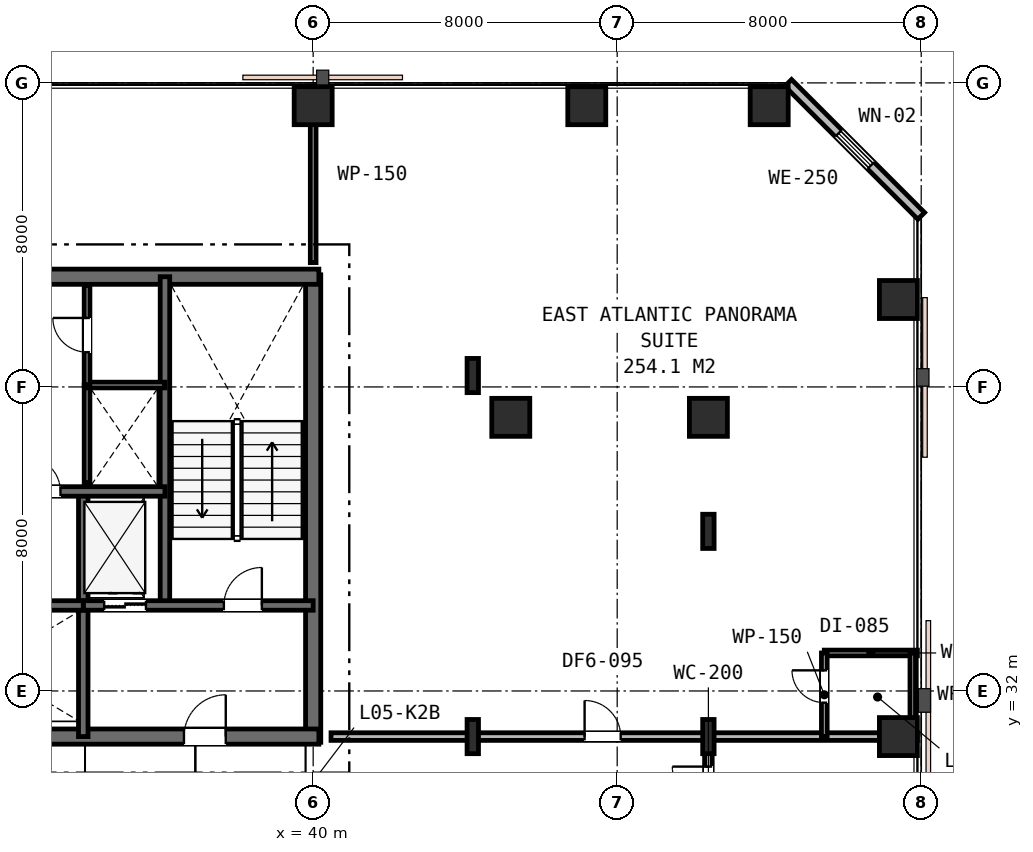
"""IFC4 building model, lengths in metres.
Left out: names, types, materials, properties, quantities, classifications, styles, units other than length and angle.
Written with IfcOpenShell. Run it as: python <this file> out.ifc"""

import sys

from ifc_helpers import new_model, si_unit, direction, frame, frame_2d, origin, origin_2d, place, context, subcontext, project, spatial, rectangle, i_section, extrude, element, fill, save


model = new_model("IFC4")
c1 = context("Model", 3, precision=1e-05, world=origin(), true_north=direction((0.0, 1.0)))
c2 = subcontext(c1, "Body", "Model", "MODEL_VIEW")
j1 = project(units=[si_unit("LENGTHUNIT", "METRE"), si_unit("PLANEANGLEUNIT", "RADIAN")], contexts=[c1])
p1 = place(None, origin())
s1 = spatial("IfcSite", under=j1, at=p1, CompositionType="ELEMENT")
p2 = place(p1, origin())
s2 = spatial("IfcBuilding", under=s1, at=p2, CompositionType="ELEMENT")
p3 = place(p2, frame((0.0, 0.0, 25.8)))
s3 = spatial("IfcBuildingStorey", under=s2, at=p3, CompositionType="ELEMENT", Elevation=25.8)
p4 = place(p3, frame((40.0, 30.65, 0.0), z_axis=(0.0, 0.0, 1.0), x_axis=(0.0, 1.0, 0.0)))
e1 = element("IfcWall", 1, at=p4, inside=s3, PredefinedType="SHEAR", context=c2, shape_type="SweptSolid", body=[
    extrude(rectangle(XDim=12.3, YDim=0.4, at=frame_2d((6.15, 0.0))), origin(), (0.0, 0.0, 1.0), 3.6),
])
p5 = place(p3, frame((15.85, 42.9, 0.0), z_axis=(0.0, 0.0, 1.0), x_axis=(1.0, 0.0, 0.0)))
e2 = element("IfcWall", 2, at=p5, inside=s3, PredefinedType="SHEAR", context=c2, shape_type="SweptSolid", body=[
    extrude(rectangle(XDim=24.3, YDim=0.4, at=frame_2d((12.15, 0.0))), origin(), (0.0, 0.0, 1.0), 3.6),
])
p6 = place(p3, frame((28.95, 30.8, 0.0), z_axis=(0.0, 0.0, 1.0), x_axis=(1.0, 0.0, 0.0)))
e3 = element("IfcWall", 3, at=p6, inside=s3, PredefinedType="SHEAR", context=c2, shape_type="SweptSolid", body=[
    extrude(rectangle(XDim=11.2, YDim=0.4, at=frame_2d((5.6, 0.0))), origin(), (0.0, 0.0, 1.0), 3.6),
])
p7 = place(p6, frame((7.65, 0.0, 0.0)))
e4 = element("IfcOpeningElement", 4, at=p7, cuts=e3, PredefinedType="OPENING", context=c2, shape_type="SweptSolid", body=[
    extrude(rectangle(XDim=1.1, YDim=2.15, at=frame_2d((0.55, 1.075))), frame((0.0, 0.21, 0.0), z_axis=(0.0, -1.0, 0.0), x_axis=(1.0, 0.0, 0.0)), (0.0, 0.0, 1.0), 0.42),
])
p8 = place(p3, frame((36.1, 34.25, 0.0), z_axis=(0.0, 0.0, 1.0), x_axis=(0.0, 1.0, 0.0)))
e5 = element("IfcWall", 5, at=p8, inside=s3, PredefinedType="SHEAR", context=c2, shape_type="SweptSolid", body=[
    extrude(rectangle(XDim=8.65, YDim=0.25, at=frame_2d((4.325, 0.0))), origin(), (0.0, 0.0, 1.0), 3.6),
])
p9 = place(p3, frame((33.95, 30.8, 0.0), z_axis=(0.0, 0.0, 1.0), x_axis=(0.0, 1.0, 0.0)))
e6 = element("IfcWall", 6, at=p9, inside=s3, PredefinedType="SHEAR", context=c2, shape_type="SweptSolid", body=[
    extrude(rectangle(XDim=6.45, YDim=0.25, at=frame_2d((3.225, 0.0))), origin(), (0.0, 0.0, 1.0), 3.6),
])
p10 = place(p3, frame((33.95, 34.25, 0.0), z_axis=(0.0, 0.0, 1.0), x_axis=(1.0, 0.0, 0.0)))
e7 = element("IfcWall", 7, at=p10, inside=s3, PredefinedType="SHEAR", context=c2, shape_type="SweptSolid", body=[
    extrude(rectangle(XDim=6.05, YDim=0.25, at=frame_2d((3.025, 0.0))), origin(), (0.0, 0.0, 1.0), 3.6),
])
p11 = place(p10, frame((3.7, 0.0, 0.0)))
e8 = element("IfcOpeningElement", 8, at=p11, cuts=e7, PredefinedType="OPENING", context=c2, shape_type="SweptSolid", body=[
    extrude(rectangle(XDim=1.0, YDim=2.15, at=frame_2d((0.5, 1.075))), frame((0.0, 0.135, 0.0), z_axis=(0.0, -1.0, 0.0), x_axis=(1.0, 0.0, 0.0)), (0.0, 0.0, 1.0), 0.27),
])
p12 = place(p10, frame((0.55, 0.0, 0.0)))
e9 = element("IfcOpeningElement", 9, at=p12, cuts=e7, PredefinedType="OPENING", context=c2, shape_type="SweptSolid", body=[
    extrude(rectangle(XDim=1.1, YDim=2.15, at=frame_2d((0.55, 1.075))), frame((0.0, 0.135, 0.0), z_axis=(0.0, -1.0, 0.0), x_axis=(1.0, 0.0, 0.0)), (0.0, 0.0, 1.0), 0.27),
])
p13 = place(p3, frame((28.95, 34.25, 0.0), z_axis=(0.0, 0.0, 1.0), x_axis=(1.0, 0.0, 0.0)))
e10 = element("IfcWall", 10, at=p13, inside=s3, PredefinedType="SHEAR", context=c2, shape_type="SweptSolid", body=[
    extrude(rectangle(XDim=5.0, YDim=0.25, at=frame_2d((2.5, 0.0))), origin(), (0.0, 0.0, 1.0), 3.6),
])
p14 = place(p3, frame((19.9, 37.25, 0.0), z_axis=(0.0, 0.0, 1.0), x_axis=(1.0, 0.0, 0.0)))
e11 = element("IfcWall", 11, at=p14, inside=s3, PredefinedType="SHEAR", context=c2, shape_type="SweptSolid", body=[
    extrude(rectangle(XDim=16.2, YDim=0.25, at=frame_2d((8.1, 0.0))), origin(), (0.0, 0.0, 1.0), 3.6),
])
p15 = place(p14, frame((12.55, 0.0, 0.0)))
e12 = element("IfcOpeningElement", 12, at=p15, cuts=e11, PredefinedType="OPENING", context=c2, shape_type="SweptSolid", body=[
    extrude(rectangle(XDim=0.9, YDim=2.15, at=frame_2d((0.45, 1.075))), frame((0.0, 0.135, 0.0), z_axis=(0.0, -1.0, 0.0), x_axis=(1.0, 0.0, 0.0)), (0.0, 0.0, 1.0), 0.27),
])
for number, where, z_axis, x_axis in (
    (13, (45.2, 39.2, 0.0), (0.0, 0.0, 1.0), (1.0, 0.0, 0.0)),
    (14, (40.0, 47.4, 0.0), (0.0, 0.0, 1.0), (1.0, 0.0, 0.0)),
    (15, (47.2, 47.4, 0.0), (0.0, 0.0, 1.0), (1.0, 0.0, 0.0)),
    (16, (50.4, 39.2, 0.0), (0.0, 0.0, 1.0), (1.0, 0.0, 0.0)),
    (17, (55.4, 30.8, 0.0), (0.0, 0.0, 1.0), (1.0, 0.0, 0.0)),
    (18, (55.4, 42.3, 0.0), (0.0, 0.0, 1.0), (1.0, 0.0, 0.0)),
    (19, (52.0, 47.4, 0.0), (0.0, 0.0, 1.0), (1.0, 0.0, 0.0)),
):
    element("IfcColumn", number, at=place(p3, frame(where, z_axis=z_axis, x_axis=x_axis)), inside=s3, PredefinedType="COLUMN", context=c2, shape_type="SweptSolid", body=[
        extrude(rectangle(XDim=1.0, YDim=1.0, at=origin_2d()), origin(), (0.0, 0.0, 1.0), 3.6),
    ])
for number, where, z_axis, x_axis in (
    (20, (44.2, 30.8, 0.0), (0.0, 0.0, 1.0), (1.0, 0.0, 0.0)),
    (21, (44.2, 40.3, 0.0), (0.0, 0.0, 1.0), (1.0, 0.0, 0.0)),
    (22, (50.4, 30.8, 0.0), (0.0, 0.0, 1.0), (1.0, 0.0, 0.0)),
    (23, (50.4, 36.2, 0.0), (0.0, 0.0, 1.0), (1.0, 0.0, 0.0)),
):
    element("IfcColumn", number, at=place(p3, frame(where, z_axis=z_axis, x_axis=x_axis)), inside=s3, PredefinedType="COLUMN", context=c2, shape_type="SweptSolid", body=[
        extrude(i_section(OverallWidth=0.3, OverallDepth=0.9, WebThickness=0.018, FlangeThickness=0.035, FilletRadius=0.03, at=origin_2d()), origin(), (0.0, 0.0, 1.0), 3.6),
    ])
p16 = place(p3, frame((56.0, 44.5, 0.0), z_axis=(0.0, 0.0, 1.0), x_axis=(-0.707106781187, 0.707106781187, 0.0)))
e24 = element("IfcWall", 24, at=p16, inside=s3, PredefinedType="STANDARD", context=c2, shape_type="SweptSolid", body=[
    extrude(rectangle(XDim=4.95, YDim=0.25, at=frame_2d((2.475, 0.0))), origin(), (0.0, 0.0, 1.0), 3.33),
])
p17 = place(p16, frame((1.875, 0.0, 0.85)))
e25 = element("IfcOpeningElement", 25, at=p17, cuts=e24, PredefinedType="OPENING", context=c2, shape_type="SweptSolid", body=[
    extrude(rectangle(XDim=1.2, YDim=1.6, at=frame_2d((0.6, 0.8))), frame((0.0, 0.135, 0.0), z_axis=(0.0, -1.0, 0.0), x_axis=(1.0, 0.0, 0.0)), (0.0, 0.0, 1.0), 0.27),
])
p18 = place(p3, frame((34.05, 37.473, 0.0), z_axis=(0.0, 0.0, 1.0), x_axis=(0.0, 1.0, 0.0)))
e26 = element("IfcWall", 26, at=p18, inside=s3, PredefinedType="PLUMBINGWALL", context=c2, shape_type="SweptSolid", body=[
    extrude(rectangle(XDim=2.577, YDim=0.15, at=frame_2d((1.288, 0.0))), origin(), (0.0, 0.0, 1.0), 3.33),
])
p19 = place(p3, frame((34.05, 40.05, 0.0), z_axis=(0.0, 0.0, 1.0), x_axis=(1.0, 0.0, 0.0)))
e27 = element("IfcWall", 27, at=p19, inside=s3, PredefinedType="PARTITIONING", context=c2, shape_type="SweptSolid", body=[
    extrude(rectangle(XDim=2.05, YDim=0.15, at=frame_2d((1.025, 0.0))), origin(), (0.0, 0.0, 1.0), 3.33),
])
p20 = place(p3, frame((34.05, 40.05, 0.0), z_axis=(0.0, 0.0, 1.0), x_axis=(0.0, 1.0, 0.0)))
e28 = element("IfcWall", 28, at=p20, inside=s3, PredefinedType="PARTITIONING", context=c2, shape_type="SweptSolid", body=[
    extrude(rectangle(XDim=2.63, YDim=0.15, at=frame_2d((1.315, 0.0))), origin(), (0.0, 0.0, 1.0), 3.33),
])
p21 = place(p20, frame((0.865, 0.0, 0.0)))
e29 = element("IfcOpeningElement", 29, at=p21, cuts=e28, PredefinedType="OPENING", context=c2, shape_type="SweptSolid", body=[
    extrude(rectangle(XDim=0.9, YDim=2.15, at=frame_2d((0.45, 1.075))), frame((0.0, 0.085, 0.0), z_axis=(0.0, -1.0, 0.0), x_axis=(1.0, 0.0, 0.0)), (0.0, 0.0, 1.0), 0.17),
])
p22 = place(p3, frame((40.0, 43.27, 0.0), z_axis=(0.0, 0.0, 1.0), x_axis=(0.0, 1.0, 0.0)))
e30 = element("IfcWall", 30, at=p22, inside=s3, PredefinedType="PARTITIONING", context=c2, shape_type="SweptSolid", body=[
    extrude(rectangle(XDim=4.63, YDim=0.15, at=frame_2d((2.315, 0.0))), origin(), (0.0, 0.0, 1.0), 2.87),
])
p23 = place(p3, frame((40.47, 30.8, 0.0), z_axis=(0.0, 0.0, 1.0), x_axis=(1.0, 0.0, 0.0)))
e31 = element("IfcWall", 31, at=p23, inside=s3, PredefinedType="PARTITIONING", context=c2, shape_type="SweptSolid", body=[
    extrude(rectangle(XDim=15.43, YDim=0.2, at=frame_2d((7.715, 0.0))), origin(), (0.0, 0.0, 1.0), 2.68),
])
p24 = place(p23, frame((6.673, 0.0, 0.0)))
e32 = element("IfcOpeningElement", 32, at=p24, cuts=e31, PredefinedType="OPENING", context=c2, shape_type="SweptSolid", body=[
    extrude(rectangle(XDim=0.95, YDim=2.15, at=frame_2d((0.475, 1.075))), frame((0.0, 0.11, 0.0), z_axis=(0.0, -1.0, 0.0), x_axis=(1.0, 0.0, 0.0)), (0.0, 0.0, 1.0), 0.22),
])
p25 = place(p3, frame((53.45, 33.0, 0.0), z_axis=(0.0, 0.0, 1.0), x_axis=(1.0, 0.0, 0.0)))
e33 = element("IfcWall", 33, at=p25, inside=s3, PredefinedType="PARTITIONING", context=c2, shape_type="SweptSolid", body=[
    extrude(rectangle(XDim=2.45, YDim=0.15, at=frame_2d((1.225, 0.0))), origin(), (0.0, 0.0, 1.0), 2.87),
])
p26 = place(p3, frame((53.45, 30.8, 0.0), z_axis=(0.0, 0.0, 1.0), x_axis=(0.0, 1.0, 0.0)))
e34 = element("IfcWall", 34, at=p26, inside=s3, PredefinedType="PARTITIONING", context=c2, shape_type="SweptSolid", body=[
    extrude(rectangle(XDim=2.2, YDim=0.15, at=frame_2d((1.1, 0.0))), origin(), (0.0, 0.0, 1.0), 2.68),
])
p27 = place(p26, frame((0.892, 0.0, 0.0)))
e35 = element("IfcOpeningElement", 35, at=p27, cuts=e34, PredefinedType="OPENING", context=c2, shape_type="SweptSolid", body=[
    extrude(rectangle(XDim=0.85, YDim=2.15, at=frame_2d((0.425, 1.075))), frame((0.0, 0.085, 0.0), z_axis=(0.0, -1.0, 0.0), x_axis=(1.0, 0.0, 0.0)), (0.0, 0.0, 1.0), 0.17),
])
p28 = place(p3, frame((55.78, 33.0, 0.0), z_axis=(0.0, 0.0, 1.0), x_axis=(0.0, -1.0, 0.0)))
e36 = element("IfcWall", 36, at=p28, inside=s3, PredefinedType="PARTITIONING", context=c2, shape_type="SweptSolid", body=[
    extrude(rectangle(XDim=2.2, YDim=0.15, at=frame_2d((1.1, 0.0))), origin(), (0.0, 0.0, 1.0), 2.68),
])
p29 = place(p3, frame((50.4, 28.6, 0.0), z_axis=(0.0, 0.0, 1.0), x_axis=(0.0, 1.0, 0.0)))
e37 = element("IfcWall", 37, at=p29, inside=s3, PredefinedType="PARTITIONING", context=c2, shape_type="SweptSolid", body=[
    extrude(rectangle(XDim=2.2, YDim=0.2, at=frame_2d((1.1, 0.0))), origin(), (0.0, 0.0, 1.0), 2.68),
])
p30 = place(p29, frame((0.46, 0.0, 0.0)))
e38 = element("IfcOpeningElement", 38, at=p30, cuts=e37, PredefinedType="OPENING", context=c2, shape_type="SweptSolid", body=[
    extrude(rectangle(XDim=0.95, YDim=2.15, at=frame_2d((0.475, 1.075))), frame((0.0, 0.11, 0.0), z_axis=(0.0, -1.0, 0.0), x_axis=(1.0, 0.0, 0.0)), (0.0, 0.0, 1.0), 0.22),
])
p31 = place(p17, origin())
e39 = element("IfcWindow", 39, at=p31, inside=s3, PartitioningType="SINGLE_PANEL", PredefinedType="WINDOW", context=c2, shape_type="SweptSolid", body=[
    extrude(rectangle(XDim=1.2, YDim=1.6, at=frame_2d((0.6, 0.8))), frame((0.0, 0.03, 0.0), z_axis=(0.0, -1.0, 0.0), x_axis=(1.0, 0.0, 0.0)), (0.0, 0.0, 1.0), 0.06),
])
fill(e25, e39)
p32 = place(p11, origin())
e40 = element("IfcDoor", 40, at=p32, inside=s3, OperationType="SINGLE_SWING_RIGHT", PredefinedType="DOOR", context=c2, shape_type="SweptSolid", body=[
    extrude(rectangle(XDim=1.0, YDim=2.15, at=frame_2d((0.5, 1.075))), frame((0.0, 0.025, 0.0), z_axis=(0.0, -1.0, 0.0), x_axis=(1.0, 0.0, 0.0)), (0.0, 0.0, 1.0), 0.05),
])
fill(e8, e40)
p33 = place(p7, origin())
e41 = element("IfcDoor", 41, at=p33, inside=s3, OperationType="SINGLE_SWING_RIGHT", PredefinedType="DOOR", context=c2, shape_type="SweptSolid", body=[
    extrude(rectangle(XDim=1.1, YDim=2.15, at=frame_2d((0.55, 1.075))), frame((0.0, 0.025, 0.0), z_axis=(0.0, -1.0, 0.0), x_axis=(1.0, 0.0, 0.0)), (0.0, 0.0, 1.0), 0.05),
])
fill(e4, e41)
p34 = place(p15, origin())
e42 = element("IfcDoor", 42, at=p34, inside=s3, OperationType="SINGLE_SWING_LEFT", PredefinedType="DOOR", context=c2, shape_type="SweptSolid", body=[
    extrude(rectangle(XDim=0.9, YDim=2.15, at=frame_2d((0.45, 1.075))), frame((0.0, 0.025, 0.0), z_axis=(0.0, -1.0, 0.0), x_axis=(1.0, 0.0, 0.0)), (0.0, 0.0, 1.0), 0.05),
])
fill(e12, e42)
p35 = place(p21, origin())
e43 = element("IfcDoor", 43, at=p35, inside=s3, OperationType="SINGLE_SWING_RIGHT", PredefinedType="DOOR", context=c2, shape_type="SweptSolid", body=[
    extrude(rectangle(XDim=0.9, YDim=2.15, at=frame_2d((0.45, 1.075))), frame((0.0, 0.025, 0.0), z_axis=(0.0, -1.0, 0.0), x_axis=(1.0, 0.0, 0.0)), (0.0, 0.0, 1.0), 0.05),
])
fill(e29, e43)
p36 = place(p24, origin())
e44 = element("IfcDoor", 44, at=p36, inside=s3, OperationType="SINGLE_SWING_LEFT", PredefinedType="DOOR", context=c2, shape_type="SweptSolid", body=[
    extrude(rectangle(XDim=0.95, YDim=2.15, at=frame_2d((0.475, 1.075))), frame((0.0, 0.025, 0.0), z_axis=(0.0, -1.0, 0.0), x_axis=(1.0, 0.0, 0.0)), (0.0, 0.0, 1.0), 0.05),
])
fill(e32, e44)
p37 = place(p27, origin())
e45 = element("IfcDoor", 45, at=p37, inside=s3, OperationType="SINGLE_SWING_RIGHT", PredefinedType="DOOR", context=c2, shape_type="SweptSolid", body=[
    extrude(rectangle(XDim=0.85, YDim=2.15, at=frame_2d((0.425, 1.075))), frame((0.0, 0.025, 0.0), z_axis=(0.0, -1.0, 0.0), x_axis=(1.0, 0.0, 0.0)), (0.0, 0.0, 1.0), 0.05),
])
fill(e35, e45)
p38 = place(p30, origin())
e46 = element("IfcDoor", 46, at=p38, inside=s3, OperationType="SINGLE_SWING_RIGHT", PredefinedType="DOOR", context=c2, shape_type="SweptSolid", body=[
    extrude(rectangle(XDim=0.95, YDim=2.15, at=frame_2d((0.475, 1.075))), frame((0.0, 0.025, 0.0), z_axis=(0.0, -1.0, 0.0), x_axis=(1.0, 0.0, 0.0)), (0.0, 0.0, 1.0), 0.05),
])
fill(e38, e46)
p39 = place(p12, origin())
e47 = element("IfcDoor", 47, at=p39, inside=s3, OperationType="DOUBLE_DOOR_SLIDING", PredefinedType="DOOR", context=c2, shape_type="SweptSolid", body=[
    extrude(rectangle(XDim=1.1, YDim=2.15, at=frame_2d((0.55, 1.075))), frame((0.0, 0.025, 0.0), z_axis=(0.0, -1.0, 0.0), x_axis=(1.0, 0.0, 0.0)), (0.0, 0.0, 1.0), 0.05),
])
fill(e9, e47)
save(model, sys.argv[1])
